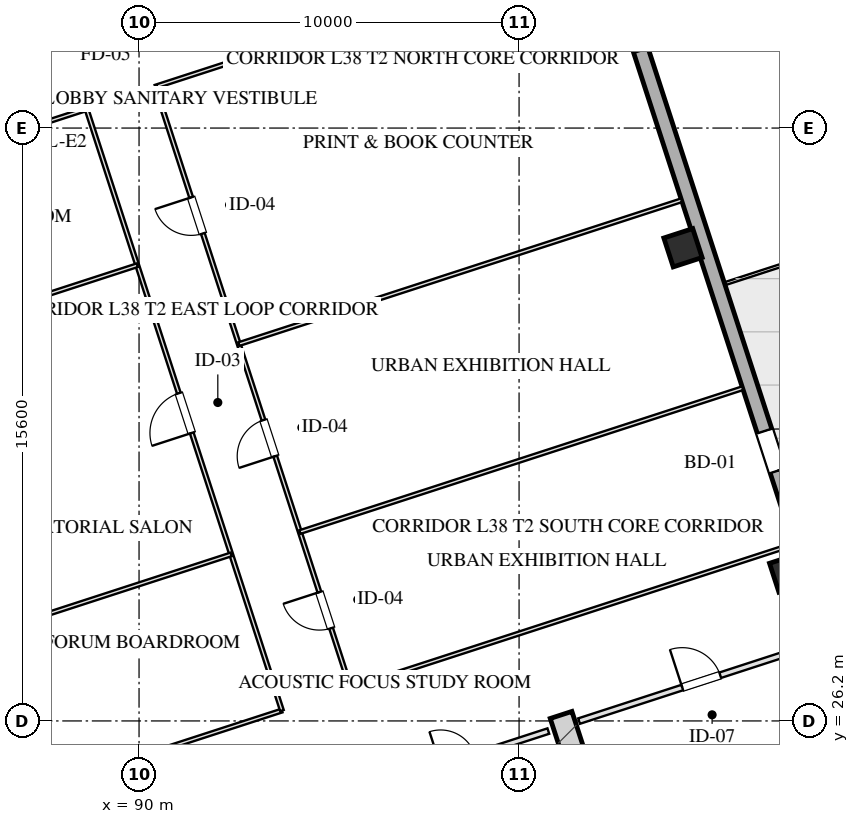
"""IFC4 building model, lengths in metres.
Left out: names, types, materials, properties, quantities, classifications, styles, units other than length and angle.
Written with IfcOpenShell. Run it as: python <this file> out.ifc"""

import sys

from ifc_helpers import new_model, si_unit, direction, frame, frame_2d, origin, origin_2d, place, context, subcontext, project, spatial, rectangle, hollow_rectangle, extrude, element, fill, save


model = new_model("IFC4")
c1 = context("Model", 3, precision=1e-05, world=origin(), true_north=direction((0.0, 1.0)))
c2 = subcontext(c1, "Body", "Model", "MODEL_VIEW")
j1 = project(units=[si_unit("LENGTHUNIT", "METRE"), si_unit("PLANEANGLEUNIT", "RADIAN")], contexts=[c1])
p1 = place(None, origin())
s1 = spatial("IfcSite", under=j1, at=p1, CompositionType="ELEMENT")
p2 = place(p1, origin())
s2 = spatial("IfcBuilding", under=s1, at=p2, CompositionType="ELEMENT")
p3 = place(p2, frame((0.0, 0.0, 146.05)))
s3 = spatial("IfcBuildingStorey", under=s2, at=p3, CompositionType="ELEMENT", Elevation=146.05)
p4 = place(p3, frame((101.105, 26.358, 0.0), z_axis=(0.0, 0.0, 1.0), x_axis=(0.309010370028, -0.95105866865, 0.0)))
e1 = element("IfcWall", 1, at=p4, inside=s3, PredefinedType="SHEAR", context=c2, shape_type="SweptSolid", body=[
    extrude(rectangle(XDim=9.48, YDim=0.6, at=frame_2d((4.74, 0.0))), origin(), (0.0, 0.0, 1.0), 3.45),
])
for number, where, z_axis, x_axis in (
    (2, (107.094, 30.091, 0.0), (0.0, 0.0, 1.0), (0.951, 0.309, 0.0)),
    (3, (104.313, 38.651, 0.0), (0.0, 0.0, 1.0), (0.951, 0.309, 0.0)),
):
    element("IfcColumn", number, at=place(p3, frame(where, z_axis=z_axis, x_axis=x_axis)), inside=s3, PredefinedType="COLUMN", context=c2, shape_type="SweptSolid", body=[
        extrude(hollow_rectangle(XDim=0.8, YDim=0.8, WallThickness=0.028, at=origin_2d()), origin(), (0.0, 0.0, 1.0), 3.451),
    ])
p5 = place(p3, frame((98.224, 59.173, 0.0), z_axis=(0.0, 0.0, 1.0), x_axis=(0.309014228706, -0.951057414911, 0.0)))
e4 = element("IfcWall", 4, at=p5, inside=s3, PredefinedType="SOLIDWALL", context=c2, shape_type="SweptSolid", body=[
    extrude(rectangle(XDim=42.8, YDim=0.4, at=frame_2d((21.4, 0.0))), origin(), (0.0, 0.0, 1.0), 2.61),
])
p6 = place(p5, frame((13.875, 0.0, 0.75)))
e5 = element("IfcOpeningElement", 5, at=p6, cuts=e4, PredefinedType="OPENING", context=c2, shape_type="SweptSolid", body=[
    extrude(rectangle(XDim=2.25, YDim=1.46, at=frame_2d((1.125, 0.73))), frame((0.0, 0.21, 0.0), z_axis=(0.0, -1.0, 0.0), x_axis=(1.0, 0.0, 0.0)), (0.0, 0.0, 1.0), 0.42),
])
p7 = place(p5, frame((26.65, 0.0, 0.0)))
e6 = element("IfcOpeningElement", 6, at=p7, cuts=e4, PredefinedType="OPENING", context=c2, shape_type="SweptSolid", body=[
    extrude(rectangle(XDim=1.1, YDim=2.15, at=frame_2d((0.55, 1.075))), frame((0.0, 0.21, 0.0), z_axis=(0.0, -1.0, 0.0), x_axis=(1.0, 0.0, 0.0)), (0.0, 0.0, 1.0), 0.42),
])
p8 = place(p3, frame((97.727, 24.944, 0.0), z_axis=(0.0, 0.0, 1.0), x_axis=(0.951036872128, 0.309077446369, 0.0)))
e7 = element("IfcWall", 7, at=p8, inside=s3, PredefinedType="PARTITIONING", context=c2, shape_type="SweptSolid", body=[
    extrude(rectangle(XDim=3.2, YDim=0.15, at=frame_2d((1.6, 0.0))), origin(), (0.0, 0.0, 1.0), 3.175),
])
p9 = place(p8, frame((0.22, 0.0, 0.0)))
e8 = element("IfcOpeningElement", 8, at=p9, cuts=e7, PredefinedType="OPENING", context=c2, shape_type="SweptSolid", body=[
    extrude(rectangle(XDim=0.95, YDim=2.05, at=frame_2d((0.475, 1.025))), frame((0.0, 0.085, 0.0), z_axis=(0.0, -1.0, 0.0), x_axis=(1.0, 0.0, 0.0)), (0.0, 0.0, 1.0), 0.17),
])
p10 = place(p3, frame((101.578, 26.196, 0.0), z_axis=(0.0, 0.0, 1.0), x_axis=(0.951064934653, 0.308991084134, 0.0)))
e9 = element("IfcWall", 9, at=p10, inside=s3, PredefinedType="PARTITIONING", context=c2, shape_type="SweptSolid", body=[
    extrude(rectangle(XDim=6.8, YDim=0.15, at=frame_2d((3.4, 0.0))), origin(), (0.0, 0.0, 1.0), 3.175),
])
p11 = place(p10, frame((2.856, 0.0, 0.0)))
e10 = element("IfcOpeningElement", 10, at=p11, cuts=e9, PredefinedType="OPENING", context=c2, shape_type="SweptSolid", body=[
    extrude(rectangle(XDim=1.05, YDim=2.05, at=frame_2d((0.525, 1.025))), frame((0.0, 0.085, 0.0), z_axis=(0.0, -1.0, 0.0), x_axis=(1.0, 0.0, 0.0)), (0.0, 0.0, 1.0), 0.17),
])
p12 = place(p3, frame((85.248, 23.708, 0.0), z_axis=(0.0, 0.0, 1.0), x_axis=(0.951059123431, 0.309008970321, 0.0)))
e11 = element("IfcWall", 11, at=p12, inside=s3, PredefinedType="MOVABLE", context=c2, shape_type="SweptSolid", body=[
    extrude(rectangle(XDim=8.95, YDim=0.1, at=frame_2d((4.475, 0.0))), origin(), (0.0, 0.0, 1.0), 3.175),
])
p13 = place(p3, frame((95.567, 27.061, 0.0), z_axis=(0.0, 0.0, 1.0), x_axis=(0.9510516424, 0.30903199428, 0.0)))
e12 = element("IfcWall", 12, at=p13, inside=s3, PredefinedType="MOVABLE", context=c2, shape_type="SweptSolid", body=[
    extrude(rectangle(XDim=12.25, YDim=0.1, at=frame_2d((6.125, 0.0))), origin(), (0.0, 0.0, 1.0), 3.175),
])
p14 = place(p3, frame((80.106, 39.533, 0.0), z_axis=(0.0, 0.0, 1.0), x_axis=(0.951059123431, 0.309008970321, 0.0)))
e13 = element("IfcWall", 13, at=p14, inside=s3, PredefinedType="MOVABLE", context=c2, shape_type="SweptSolid", body=[
    extrude(rectangle(XDim=8.95, YDim=0.1, at=frame_2d((4.475, 0.0))), origin(), (0.0, 0.0, 1.0), 3.175),
])
p15 = place(p3, frame((90.425, 42.886, 0.0), z_axis=(0.0, 0.0, 1.0), x_axis=(0.95105749975, 0.309013967595, 0.0)))
e14 = element("IfcWall", 14, at=p15, inside=s3, PredefinedType="MOVABLE", context=c2, shape_type="SweptSolid", body=[
    extrude(rectangle(XDim=12.25, YDim=0.1, at=frame_2d((6.125, 0.0))), origin(), (0.0, 0.0, 1.0), 3.175),
])
p16 = place(p3, frame((93.76, 26.473, 0.0), z_axis=(0.0, 0.0, 1.0), x_axis=(-0.309004459387, 0.951060589068, 0.0)))
e15 = element("IfcWall", 15, at=p16, inside=s3, PredefinedType="MOVABLE", context=c2, shape_type="SweptSolid", body=[
    extrude(rectangle(XDim=16.64, YDim=0.1, at=frame_2d((8.32, 0.0))), origin(), (0.0, 0.0, 1.0), 3.175),
])
p17 = place(p16, frame((7.68, 0.0, 0.0)))
e16 = element("IfcOpeningElement", 16, at=p17, cuts=e15, PredefinedType="OPENING", context=c2, shape_type="SweptSolid", body=[
    extrude(rectangle(XDim=1.1, YDim=2.05, at=frame_2d((0.55, 1.025))), frame((0.0, 0.06, 0.0), z_axis=(0.0, -1.0, 0.0), x_axis=(1.0, 0.0, 0.0)), (0.0, 0.0, 1.0), 0.12),
])
p18 = place(p3, frame((95.567, 27.061, 0.0), z_axis=(0.0, 0.0, 1.0), x_axis=(-0.30901773025, 0.951056277195, 0.0)))
e17 = element("IfcWall", 17, at=p18, inside=s3, PredefinedType="MOVABLE", context=c2, shape_type="SweptSolid", body=[
    extrude(rectangle(XDim=16.64, YDim=0.1, at=frame_2d((8.32, 0.0))), origin(), (0.0, 0.0, 1.0), 3.175),
])
p19 = place(p18, frame((1.66, 0.0, 0.0)))
e18 = element("IfcOpeningElement", 18, at=p19, cuts=e17, PredefinedType="OPENING", context=c2, shape_type="SweptSolid", body=[
    extrude(rectangle(XDim=1.0, YDim=2.05, at=frame_2d((0.5, 1.025))), frame((0.0, 0.06, 0.0), z_axis=(0.0, -1.0, 0.0), x_axis=(1.0, 0.0, 0.0)), (0.0, 0.0, 1.0), 0.12),
])
p20 = place(p18, frame((6.42, 0.0, 0.0)))
e19 = element("IfcOpeningElement", 19, at=p20, cuts=e17, PredefinedType="OPENING", context=c2, shape_type="SweptSolid", body=[
    extrude(rectangle(XDim=1.0, YDim=2.05, at=frame_2d((0.5, 1.025))), frame((0.0, 0.06, 0.0), z_axis=(0.0, -1.0, 0.0), x_axis=(1.0, 0.0, 0.0)), (0.0, 0.0, 1.0), 0.12),
])
p21 = place(p18, frame((12.58, 0.0, 0.0)))
e20 = element("IfcOpeningElement", 20, at=p21, cuts=e17, PredefinedType="OPENING", context=c2, shape_type="SweptSolid", body=[
    extrude(rectangle(XDim=1.0, YDim=2.05, at=frame_2d((0.5, 1.025))), frame((0.0, 0.06, 0.0), z_axis=(0.0, -1.0, 0.0), x_axis=(1.0, 0.0, 0.0)), (0.0, 0.0, 1.0), 0.12),
])
p22 = place(p3, frame((83.913, 27.816, 0.0), z_axis=(0.0, 0.0, 1.0), x_axis=(0.951059123431, 0.309008970321, 0.0)))
e21 = element("IfcWall", 21, at=p22, inside=s3, PredefinedType="MOVABLE", context=c2, shape_type="SweptSolid", body=[
    extrude(rectangle(XDim=8.95, YDim=0.1, at=frame_2d((4.475, 0.0))), origin(), (0.0, 0.0, 1.0), 3.175),
])
p23 = place(p3, frame((81.441, 35.425, 0.0), z_axis=(0.0, 0.0, 1.0), x_axis=(0.951056518616, 0.309016987233, 0.0)))
e22 = element("IfcWall", 22, at=p23, inside=s3, PredefinedType="MOVABLE", context=c2, shape_type="SweptSolid", body=[
    extrude(rectangle(XDim=8.95, YDim=0.1, at=frame_2d((4.475, 0.0))), origin(), (0.0, 0.0, 1.0), 3.175),
])
for number, where, z_axis, x_axis in (
    (23, (94.232, 31.169, 0.0), (0.0, 0.0, 1.0), (0.951, 0.309, 0.0)),
    (24, (92.625, 36.115, 0.0), (0.0, 0.0, 1.0), (0.951, 0.309, 0.0)),
):
    element("IfcWall", number, at=place(p3, frame(where, z_axis=z_axis, x_axis=x_axis)), inside=s3, PredefinedType="MOVABLE", context=c2, shape_type="SweptSolid", body=[
        extrude(rectangle(XDim=12.25, YDim=0.1, at=frame_2d((6.125, 0.0))), origin(), (0.0, 0.0, 1.0), 3.175),
    ])
p24 = place(p7, origin())
e25 = element("IfcDoor", 25, at=p24, inside=s3, OperationType="SINGLE_SWING_RIGHT", PredefinedType="DOOR", context=c2, shape_type="SweptSolid", body=[
    extrude(rectangle(XDim=1.1, YDim=2.15, at=frame_2d((0.55, 1.075))), frame((0.0, 0.025, 0.0), z_axis=(0.0, -1.0, 0.0), x_axis=(1.0, 0.0, 0.0)), (0.0, 0.0, 1.0), 0.05),
])
fill(e6, e25)
p25 = place(p11, origin())
e26 = element("IfcDoor", 26, at=p25, inside=s3, OperationType="SINGLE_SWING_LEFT", PredefinedType="DOOR", context=c2, shape_type="SweptSolid", body=[
    extrude(rectangle(XDim=1.05, YDim=2.05, at=frame_2d((0.525, 1.025))), frame((0.0, 0.025, 0.0), z_axis=(0.0, -1.0, 0.0), x_axis=(1.0, 0.0, 0.0)), (0.0, 0.0, 1.0), 0.05),
])
fill(e10, e26)
p26 = place(p17, origin())
e27 = element("IfcDoor", 27, at=p26, inside=s3, OperationType="SINGLE_SWING_LEFT", PredefinedType="DOOR", context=c2, shape_type="SweptSolid", body=[
    extrude(rectangle(XDim=1.1, YDim=2.05, at=frame_2d((0.55, 1.025))), frame((0.0, 0.025, 0.0), z_axis=(0.0, -1.0, 0.0), x_axis=(1.0, 0.0, 0.0)), (0.0, 0.0, 1.0), 0.05),
])
fill(e16, e27)
p27 = place(p19, origin())
e28 = element("IfcDoor", 28, at=p27, inside=s3, OperationType="SINGLE_SWING_RIGHT", PredefinedType="DOOR", context=c2, shape_type="SweptSolid", body=[
    extrude(rectangle(XDim=1.0, YDim=2.05, at=frame_2d((0.5, 1.025))), frame((0.0, 0.025, 0.0), z_axis=(0.0, -1.0, 0.0), x_axis=(1.0, 0.0, 0.0)), (0.0, 0.0, 1.0), 0.05),
])
fill(e18, e28)
p28 = place(p20, origin())
e29 = element("IfcDoor", 29, at=p28, inside=s3, OperationType="SINGLE_SWING_LEFT", PredefinedType="DOOR", context=c2, shape_type="SweptSolid", body=[
    extrude(rectangle(XDim=1.0, YDim=2.05, at=frame_2d((0.5, 1.025))), frame((0.0, 0.025, 0.0), z_axis=(0.0, -1.0, 0.0), x_axis=(1.0, 0.0, 0.0)), (0.0, 0.0, 1.0), 0.05),
])
fill(e19, e29)
p29 = place(p21, origin())
e30 = element("IfcDoor", 30, at=p29, inside=s3, OperationType="SINGLE_SWING_RIGHT", PredefinedType="DOOR", context=c2, shape_type="SweptSolid", body=[
    extrude(rectangle(XDim=1.0, YDim=2.05, at=frame_2d((0.5, 1.025))), frame((0.0, 0.025, 0.0), z_axis=(0.0, -1.0, 0.0), x_axis=(1.0, 0.0, 0.0)), (0.0, 0.0, 1.0), 0.05),
])
fill(e20, e30)
save(model, sys.argv[1])
